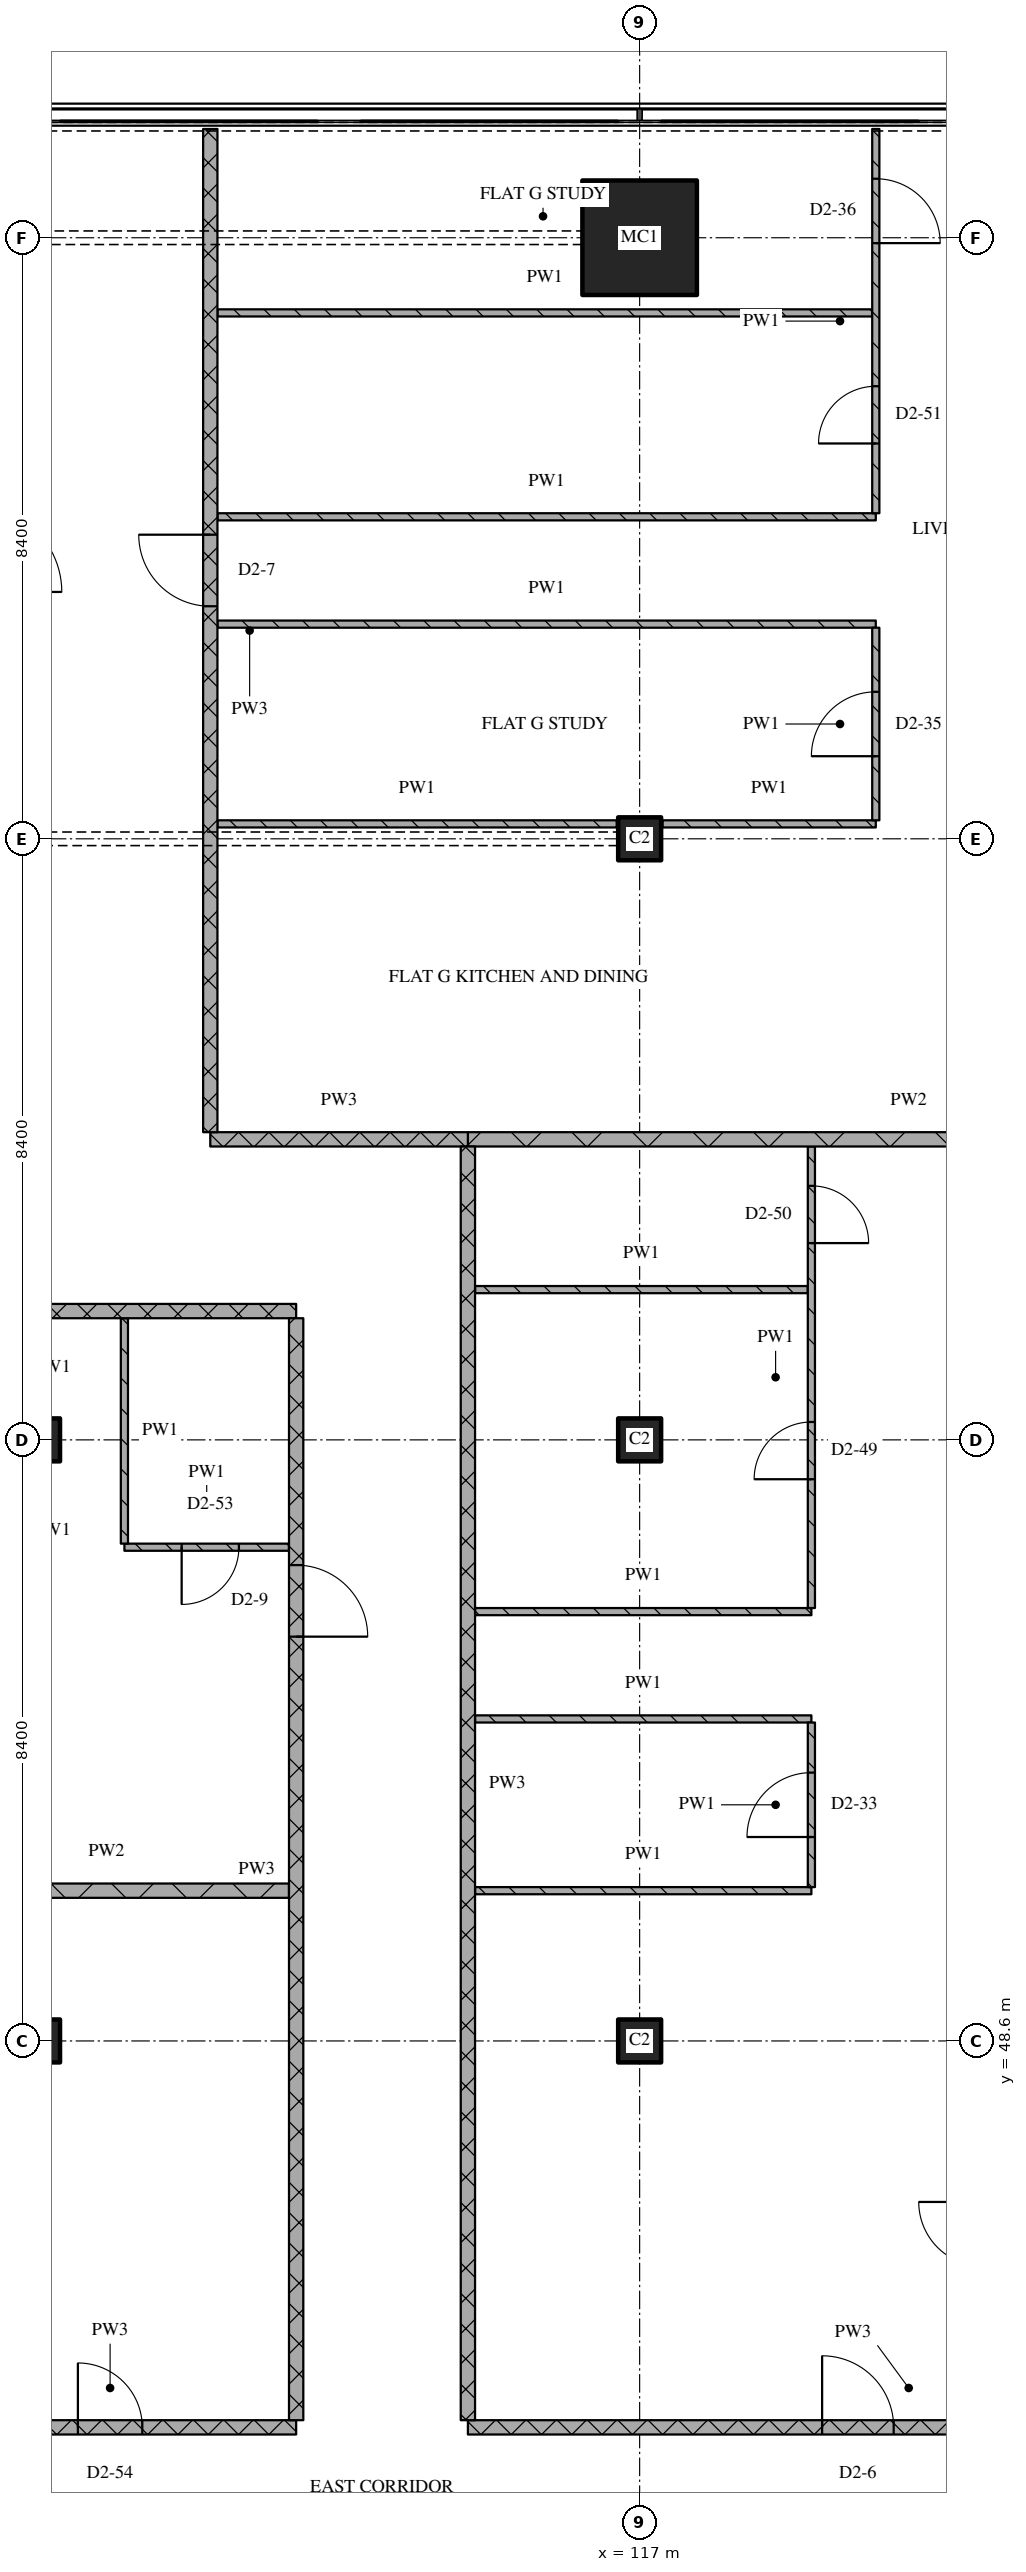
"""IFC4 building model, lengths in metres.
Left out: names, types, materials, properties, quantities, classifications, styles, units other than length and angle.
Written with IfcOpenShell. Run it as: python <this file> out.ifc"""

import sys

from ifc_helpers import new_model, si_unit, direction, frame, frame_2d, origin, origin_2d, place, context, subcontext, project, spatial, rectangle, extrude, element, fill, save


model = new_model("IFC4")
c1 = context("Model", 3, precision=1e-05, world=origin(), true_north=direction((0.0, 1.0)))
c2 = subcontext(c1, "Body", "Model", "MODEL_VIEW")
j1 = project(units=[si_unit("LENGTHUNIT", "METRE"), si_unit("PLANEANGLEUNIT", "RADIAN")], contexts=[c1])
p1 = place(None, origin())
s1 = spatial("IfcSite", under=j1, at=p1, CompositionType="ELEMENT")
p2 = place(p1, origin())
s2 = spatial("IfcBuilding", under=s1, at=p2, CompositionType="ELEMENT")
p3 = place(p2, frame((0.0, 0.0, 216.3)))
s3 = spatial("IfcBuildingStorey", under=s2, at=p3, CompositionType="ELEMENT", Elevation=216.3)
for number, where, z_axis, x_axis in (
    (1, (108.6, 48.6, 0.0), (0.0, 0.0, 1.0), (1.0, 0.0, 0.0)),
    (2, (108.6, 57.0, 0.0), (0.0, 0.0, 1.0), (1.0, 0.0, 0.0)),
    (3, (117.0, 48.6, 0.0), (0.0, 0.0, 1.0), (1.0, 0.0, 0.0)),
    (4, (117.0, 57.0, 0.0), (0.0, 0.0, 1.0), (1.0, 0.0, 0.0)),
    (5, (117.0, 65.4, 0.0), (0.0, 0.0, 1.0), (1.0, 0.0, 0.0)),
):
    element("IfcColumn", number, at=place(p3, frame(where, z_axis=z_axis, x_axis=x_axis)), inside=s3, PredefinedType="COLUMN", context=c2, shape_type="SweptSolid", body=[
        extrude(rectangle(XDim=0.6, YDim=0.6, at=origin_2d()), origin(), (0.0, 0.0, 1.0), 3.6),
    ])
p4 = place(p3, frame((117.0, 73.8, 0.0), z_axis=(0.0, 0.0, 1.0), x_axis=(1.0, 0.0, 0.0)))
e6 = element("IfcColumn", 6, at=p4, inside=s3, PredefinedType="COLUMN", context=c2, shape_type="SweptSolid", body=[
    extrude(rectangle(XDim=1.6, YDim=1.6, at=origin_2d()), origin(), (0.0, 0.0, 1.0), 3.6),
])
p5 = place(p3, frame((107.0, 43.2, 0.0), z_axis=(0.0, 0.0, 1.0), x_axis=(1.0, 0.0, 0.0)))
e7 = element("IfcWall", 7, at=p5, inside=s3, PredefinedType="PARTITIONING", context=c2, shape_type="SweptSolid", body=[
    extrude(rectangle(XDim=5.2, YDim=0.2, at=frame_2d((2.6, 0.0))), origin(), (0.0, 0.0, 1.0), 3.32),
])
p6 = place(p5, frame((2.15, 0.0, 0.0)))
e8 = element("IfcOpeningElement", 8, at=p6, cuts=e7, PredefinedType="OPENING", context=c2, shape_type="SweptSolid", body=[
    extrude(rectangle(XDim=0.9, YDim=2.1, at=frame_2d((0.45, 1.05))), frame((0.0, 0.11, 0.0), z_axis=(0.0, -1.0, 0.0), x_axis=(1.0, 0.0, 0.0)), (0.0, 0.0, 1.0), 0.22),
])
p7 = place(p3, frame((114.6, 43.2, 0.0), z_axis=(0.0, 0.0, 1.0), x_axis=(1.0, 0.0, 0.0)))
e9 = element("IfcWall", 9, at=p7, inside=s3, PredefinedType="PARTITIONING", context=c2, shape_type="SweptSolid", body=[
    extrude(rectangle(XDim=12.32, YDim=0.2, at=frame_2d((6.16, 0.0))), origin(), (0.0, 0.0, 1.0), 3.32),
])
p8 = place(p7, frame((4.95, 0.0, 0.0)))
e10 = element("IfcOpeningElement", 10, at=p8, cuts=e9, PredefinedType="OPENING", context=c2, shape_type="SweptSolid", body=[
    extrude(rectangle(XDim=1.0, YDim=2.1, at=frame_2d((0.5, 1.05))), frame((0.0, 0.11, 0.0), z_axis=(0.0, -1.0, 0.0), x_axis=(1.0, 0.0, 0.0)), (0.0, 0.0, 1.0), 0.22),
])
p9 = place(p3, frame((107.0, 50.7, 0.0), z_axis=(0.0, 0.0, 1.0), x_axis=(1.0, 0.0, 0.0)))
e11 = element("IfcWall", 11, at=p9, inside=s3, PredefinedType="PARTITIONING", context=c2, shape_type="SweptSolid", body=[
    extrude(rectangle(XDim=5.1, YDim=0.2, at=frame_2d((2.55, 0.0))), origin(), (0.0, 0.0, 1.0), 3.32),
])
for number, where, z_axis, x_axis in (
    (12, (114.7, 50.7, 0.0), (0.0, 0.0, 1.0), (1.0, 0.0, 0.0)),
    (13, (114.7, 53.1, 0.0), (0.0, 0.0, 1.0), (1.0, 0.0, 0.0)),
    (14, (114.7, 54.6, 0.0), (0.0, 0.0, 1.0), (1.0, 0.0, 0.0)),
):
    element("IfcWall", number, at=place(p3, frame(where, z_axis=z_axis, x_axis=x_axis)), inside=s3, PredefinedType="PARTITIONING", context=c2, shape_type="SweptSolid", body=[
        extrude(rectangle(XDim=4.7, YDim=0.1, at=frame_2d((2.35, 0.0))), origin(), (0.0, 0.0, 1.0), 3.32),
    ])
p10 = place(p3, frame((109.8, 55.5, 0.0), z_axis=(0.0, 0.0, 1.0), x_axis=(1.0, 0.0, 0.0)))
e15 = element("IfcWall", 15, at=p10, inside=s3, PredefinedType="PARTITIONING", context=c2, shape_type="SweptSolid", body=[
    extrude(rectangle(XDim=2.3, YDim=0.1, at=frame_2d((1.15, 0.0))), origin(), (0.0, 0.0, 1.0), 3.32),
])
p11 = place(p10, frame((0.8, 0.0, 0.0)))
e16 = element("IfcOpeningElement", 16, at=p11, cuts=e15, PredefinedType="OPENING", context=c2, shape_type="SweptSolid", body=[
    extrude(rectangle(XDim=0.8, YDim=2.1, at=frame_2d((0.4, 1.05))), frame((0.0, 0.06, 0.0), z_axis=(0.0, -1.0, 0.0), x_axis=(1.0, 0.0, 0.0)), (0.0, 0.0, 1.0), 0.12),
])
p12 = place(p3, frame((101.4, 58.8, 0.0), z_axis=(0.0, 0.0, 1.0), x_axis=(1.0, 0.0, 0.0)))
e17 = element("IfcWall", 17, at=p12, inside=s3, PredefinedType="PARTITIONING", context=c2, shape_type="SweptSolid", body=[
    extrude(rectangle(XDim=10.8, YDim=0.2, at=frame_2d((5.4, 0.0))), origin(), (0.0, 0.0, 1.0), 3.32),
])
p13 = place(p3, frame((114.7, 59.1, 0.0), z_axis=(0.0, 0.0, 1.0), x_axis=(1.0, 0.0, 0.0)))
e18 = element("IfcWall", 18, at=p13, inside=s3, PredefinedType="PARTITIONING", context=c2, shape_type="SweptSolid", body=[
    extrude(rectangle(XDim=4.65, YDim=0.1, at=frame_2d((2.325, 0.0))), origin(), (0.0, 0.0, 1.0), 3.32),
])
p14 = place(p3, frame((111.0, 61.2, 0.0), z_axis=(0.0, 0.0, 1.0), x_axis=(1.0, 0.0, 0.0)))
e19 = element("IfcWall", 19, at=p14, inside=s3, PredefinedType="PARTITIONING", context=c2, shape_type="SweptSolid", body=[
    extrude(rectangle(XDim=3.6, YDim=0.2, at=frame_2d((1.8, 0.0))), origin(), (0.0, 0.0, 1.0), 3.32),
])
p15 = place(p3, frame((114.6, 61.2, 0.0), z_axis=(0.0, 0.0, 1.0), x_axis=(1.0, 0.0, 0.0)))
e20 = element("IfcWall", 20, at=p15, inside=s3, PredefinedType="PARTITIONING", context=c2, shape_type="SweptSolid", body=[
    extrude(rectangle(XDim=12.32, YDim=0.2, at=frame_2d((6.16, 0.0))), origin(), (0.0, 0.0, 1.0), 3.32),
])
p16 = place(p3, frame((111.1, 65.609, 0.0), z_axis=(0.0, 0.0, 1.0), x_axis=(1.0, 0.0, 0.0)))
e21 = element("IfcWall", 21, at=p16, inside=s3, PredefinedType="PARTITIONING", context=c2, shape_type="SweptSolid", body=[
    extrude(rectangle(XDim=5.58, YDim=0.1, at=frame_2d((2.79, 0.0))), origin(), (0.0, 0.0, 1.0), 3.32),
])
p17 = place(p3, frame((117.32, 65.609, 0.0), z_axis=(0.0, 0.0, 1.0), x_axis=(1.0, 0.0, 0.0)))
e22 = element("IfcWall", 22, at=p17, inside=s3, PredefinedType="PARTITIONING", context=c2, shape_type="SweptSolid", body=[
    extrude(rectangle(XDim=2.98, YDim=0.1, at=frame_2d((1.49, 0.0))), origin(), (0.0, 0.0, 1.0), 3.32),
])
for number, where, z_axis, x_axis in (
    (23, (111.1, 68.4, 0.0), (0.0, 0.0, 1.0), (1.0, 0.0, 0.0)),
    (24, (111.1, 69.9, 0.0), (0.0, 0.0, 1.0), (1.0, 0.0, 0.0)),
):
    element("IfcWall", number, at=place(p3, frame(where, z_axis=z_axis, x_axis=x_axis)), inside=s3, PredefinedType="PARTITIONING", context=c2, shape_type="SweptSolid", body=[
        extrude(rectangle(XDim=9.2, YDim=0.1, at=frame_2d((4.6, 0.0))), origin(), (0.0, 0.0, 1.0), 3.32),
    ])
p18 = place(p3, frame((111.1, 72.75, 0.0), z_axis=(0.0, 0.0, 1.0), x_axis=(1.0, 0.0, 0.0)))
e25 = element("IfcWall", 25, at=p18, inside=s3, PredefinedType="PARTITIONING", context=c2, shape_type="SweptSolid", body=[
    extrude(rectangle(XDim=9.15, YDim=0.1, at=frame_2d((4.575, 0.0))), origin(), (0.0, 0.0, 1.0), 3.32),
])
p19 = place(p3, frame((109.8, 58.7, 0.0), z_axis=(0.0, 0.0, 1.0), x_axis=(0.0, -1.0, 0.0)))
e26 = element("IfcWall", 26, at=p19, inside=s3, PredefinedType="PARTITIONING", context=c2, shape_type="SweptSolid", body=[
    extrude(rectangle(XDim=3.15, YDim=0.1, at=frame_2d((1.575, 0.0))), origin(), (0.0, 0.0, 1.0), 3.32),
])
p20 = place(p3, frame((111.0, 75.32, 0.0), z_axis=(0.0, 0.0, 1.0), x_axis=(0.0, -1.0, 0.0)))
e27 = element("IfcWall", 27, at=p20, inside=s3, PredefinedType="PARTITIONING", context=c2, shape_type="SweptSolid", body=[
    extrude(rectangle(XDim=14.02, YDim=0.2, at=frame_2d((7.01, 0.0))), origin(), (0.0, 0.0, 1.0), 3.32),
])
p21 = place(p20, frame((5.67, 0.0, 0.0)))
e28 = element("IfcOpeningElement", 28, at=p21, cuts=e27, PredefinedType="OPENING", context=c2, shape_type="SweptSolid", body=[
    extrude(rectangle(XDim=1.0, YDim=2.1, at=frame_2d((0.5, 1.05))), frame((0.0, 0.11, 0.0), z_axis=(0.0, -1.0, 0.0), x_axis=(1.0, 0.0, 0.0)), (0.0, 0.0, 1.0), 0.22),
])
p22 = place(p3, frame((112.2, 43.3, 0.0), z_axis=(0.0, 0.0, 1.0), x_axis=(0.0, 1.0, 0.0)))
e29 = element("IfcWall", 29, at=p22, inside=s3, PredefinedType="PARTITIONING", context=c2, shape_type="SweptSolid", body=[
    extrude(rectangle(XDim=15.4, YDim=0.2, at=frame_2d((7.7, 0.0))), origin(), (0.0, 0.0, 1.0), 3.32),
])
p23 = place(p22, frame((10.95, 0.0, 0.0)))
e30 = element("IfcOpeningElement", 30, at=p23, cuts=e29, PredefinedType="OPENING", context=c2, shape_type="SweptSolid", body=[
    extrude(rectangle(XDim=1.0, YDim=2.1, at=frame_2d((0.5, 1.05))), frame((0.0, 0.11, 0.0), z_axis=(0.0, -1.0, 0.0), x_axis=(1.0, 0.0, 0.0)), (0.0, 0.0, 1.0), 0.22),
])
p24 = place(p3, frame((114.6, 61.1, 0.0), z_axis=(0.0, 0.0, 1.0), x_axis=(0.0, -1.0, 0.0)))
e31 = element("IfcWall", 31, at=p24, inside=s3, PredefinedType="PARTITIONING", context=c2, shape_type="SweptSolid", body=[
    extrude(rectangle(XDim=17.8, YDim=0.2, at=frame_2d((8.9, 0.0))), origin(), (0.0, 0.0, 1.0), 3.32),
])
p25 = place(p3, frame((119.4, 50.75, 0.0), z_axis=(0.0, 0.0, 1.0), x_axis=(0.0, 1.0, 0.0)))
e32 = element("IfcWall", 32, at=p25, inside=s3, PredefinedType="PARTITIONING", context=c2, shape_type="SweptSolid", body=[
    extrude(rectangle(XDim=2.3, YDim=0.1, at=frame_2d((1.15, 0.0))), origin(), (0.0, 0.0, 1.0), 3.32),
])
p26 = place(p25, frame((0.7, 0.0, 0.0)))
e33 = element("IfcOpeningElement", 33, at=p26, cuts=e32, PredefinedType="OPENING", context=c2, shape_type="SweptSolid", body=[
    extrude(rectangle(XDim=0.9, YDim=2.1, at=frame_2d((0.45, 1.05))), frame((0.0, 0.06, 0.0), z_axis=(0.0, -1.0, 0.0), x_axis=(1.0, 0.0, 0.0)), (0.0, 0.0, 1.0), 0.12),
])
p27 = place(p3, frame((119.4, 54.65, 0.0), z_axis=(0.0, 0.0, 1.0), x_axis=(0.0, 1.0, 0.0)))
e34 = element("IfcWall", 34, at=p27, inside=s3, PredefinedType="PARTITIONING", context=c2, shape_type="SweptSolid", body=[
    extrude(rectangle(XDim=6.45, YDim=0.1, at=frame_2d((3.225, 0.0))), origin(), (0.0, 0.0, 1.0), 3.32),
])
p28 = place(p27, frame((1.8, 0.0, 0.0)))
e35 = element("IfcOpeningElement", 35, at=p28, cuts=e34, PredefinedType="OPENING", context=c2, shape_type="SweptSolid", body=[
    extrude(rectangle(XDim=0.8, YDim=2.1, at=frame_2d((0.4, 1.05))), frame((0.0, 0.06, 0.0), z_axis=(0.0, -1.0, 0.0), x_axis=(1.0, 0.0, 0.0)), (0.0, 0.0, 1.0), 0.12),
])
p29 = place(p27, frame((5.1, 0.0, 0.0)))
e36 = element("IfcOpeningElement", 36, at=p29, cuts=e34, PredefinedType="OPENING", context=c2, shape_type="SweptSolid", body=[
    extrude(rectangle(XDim=0.8, YDim=2.1, at=frame_2d((0.4, 1.05))), frame((0.0, 0.06, 0.0), z_axis=(0.0, -1.0, 0.0), x_axis=(1.0, 0.0, 0.0)), (0.0, 0.0, 1.0), 0.12),
])
p30 = place(p3, frame((120.3, 65.659, 0.0), z_axis=(0.0, 0.0, 1.0), x_axis=(0.0, 1.0, 0.0)))
e37 = element("IfcWall", 37, at=p30, inside=s3, PredefinedType="PARTITIONING", context=c2, shape_type="SweptSolid", body=[
    extrude(rectangle(XDim=2.691, YDim=0.1, at=frame_2d((1.346, 0.0))), origin(), (0.0, 0.0, 1.0), 3.32),
])
p31 = place(p30, frame((0.896, 0.0, 0.0)))
e38 = element("IfcOpeningElement", 38, at=p31, cuts=e37, PredefinedType="OPENING", context=c2, shape_type="SweptSolid", body=[
    extrude(rectangle(XDim=0.9, YDim=2.1, at=frame_2d((0.45, 1.05))), frame((0.0, 0.06, 0.0), z_axis=(0.0, -1.0, 0.0), x_axis=(1.0, 0.0, 0.0)), (0.0, 0.0, 1.0), 0.12),
])
p32 = place(p3, frame((120.3, 69.95, 0.0), z_axis=(0.0, 0.0, 1.0), x_axis=(0.0, 1.0, 0.0)))
e39 = element("IfcWall", 39, at=p32, inside=s3, PredefinedType="PARTITIONING", context=c2, shape_type="SweptSolid", body=[
    extrude(rectangle(XDim=5.37, YDim=0.1, at=frame_2d((2.685, 0.0))), origin(), (0.0, 0.0, 1.0), 3.32),
])
p33 = place(p32, frame((0.975, 0.0, 0.0)))
e40 = element("IfcOpeningElement", 40, at=p33, cuts=e39, PredefinedType="OPENING", context=c2, shape_type="SweptSolid", body=[
    extrude(rectangle(XDim=0.8, YDim=2.1, at=frame_2d((0.4, 1.05))), frame((0.0, 0.06, 0.0), z_axis=(0.0, -1.0, 0.0), x_axis=(1.0, 0.0, 0.0)), (0.0, 0.0, 1.0), 0.12),
])
p34 = place(p32, frame((3.775, 0.0, 0.0)))
e41 = element("IfcOpeningElement", 41, at=p34, cuts=e39, PredefinedType="OPENING", context=c2, shape_type="SweptSolid", body=[
    extrude(rectangle(XDim=0.9, YDim=2.1, at=frame_2d((0.45, 1.05))), frame((0.0, 0.06, 0.0), z_axis=(0.0, -1.0, 0.0), x_axis=(1.0, 0.0, 0.0)), (0.0, 0.0, 1.0), 0.12),
])
p35 = place(p6, origin())
e42 = element("IfcDoor", 42, at=p35, inside=s3, OperationType="SINGLE_SWING_LEFT", PredefinedType="DOOR", context=c2, shape_type="SweptSolid", body=[
    extrude(rectangle(XDim=0.9, YDim=2.1, at=frame_2d((0.45, 1.05))), frame((0.0, 0.025, 0.0), z_axis=(0.0, -1.0, 0.0), x_axis=(1.0, 0.0, 0.0)), (0.0, 0.0, 1.0), 0.05),
])
fill(e8, e42)
p36 = place(p8, origin())
e43 = element("IfcDoor", 43, at=p36, inside=s3, OperationType="SINGLE_SWING_LEFT", PredefinedType="DOOR", context=c2, shape_type="SweptSolid", body=[
    extrude(rectangle(XDim=1.0, YDim=2.1, at=frame_2d((0.5, 1.05))), frame((0.0, 0.025, 0.0), z_axis=(0.0, -1.0, 0.0), x_axis=(1.0, 0.0, 0.0)), (0.0, 0.0, 1.0), 0.05),
])
fill(e10, e43)
p37 = place(p11, origin())
e44 = element("IfcDoor", 44, at=p37, inside=s3, OperationType="SINGLE_SWING_RIGHT", PredefinedType="DOOR", context=c2, shape_type="SweptSolid", body=[
    extrude(rectangle(XDim=0.8, YDim=2.1, at=frame_2d((0.4, 1.05))), frame((0.0, 0.025, 0.0), z_axis=(0.0, -1.0, 0.0), x_axis=(1.0, 0.0, 0.0)), (0.0, 0.0, 1.0), 0.05),
])
fill(e16, e44)
p38 = place(p21, origin())
e45 = element("IfcDoor", 45, at=p38, inside=s3, OperationType="SINGLE_SWING_RIGHT", PredefinedType="DOOR", context=c2, shape_type="SweptSolid", body=[
    extrude(rectangle(XDim=1.0, YDim=2.1, at=frame_2d((0.5, 1.05))), frame((0.0, 0.025, 0.0), z_axis=(0.0, -1.0, 0.0), x_axis=(1.0, 0.0, 0.0)), (0.0, 0.0, 1.0), 0.05),
])
fill(e28, e45)
p39 = place(p23, origin())
e46 = element("IfcDoor", 46, at=p39, inside=s3, OperationType="SINGLE_SWING_RIGHT", PredefinedType="DOOR", context=c2, shape_type="SweptSolid", body=[
    extrude(rectangle(XDim=1.0, YDim=2.1, at=frame_2d((0.5, 1.05))), frame((0.0, 0.025, 0.0), z_axis=(0.0, -1.0, 0.0), x_axis=(1.0, 0.0, 0.0)), (0.0, 0.0, 1.0), 0.05),
])
fill(e30, e46)
p40 = place(p26, origin())
e47 = element("IfcDoor", 47, at=p40, inside=s3, OperationType="SINGLE_SWING_LEFT", PredefinedType="DOOR", context=c2, shape_type="SweptSolid", body=[
    extrude(rectangle(XDim=0.9, YDim=2.1, at=frame_2d((0.45, 1.05))), frame((0.0, 0.025, 0.0), z_axis=(0.0, -1.0, 0.0), x_axis=(1.0, 0.0, 0.0)), (0.0, 0.0, 1.0), 0.05),
])
fill(e33, e47)
p41 = place(p28, origin())
e48 = element("IfcDoor", 48, at=p41, inside=s3, OperationType="SINGLE_SWING_LEFT", PredefinedType="DOOR", context=c2, shape_type="SweptSolid", body=[
    extrude(rectangle(XDim=0.8, YDim=2.1, at=frame_2d((0.4, 1.05))), frame((0.0, 0.025, 0.0), z_axis=(0.0, -1.0, 0.0), x_axis=(1.0, 0.0, 0.0)), (0.0, 0.0, 1.0), 0.05),
])
fill(e35, e48)
p42 = place(p29, origin())
e49 = element("IfcDoor", 49, at=p42, inside=s3, OperationType="SINGLE_SWING_RIGHT", PredefinedType="DOOR", context=c2, shape_type="SweptSolid", body=[
    extrude(rectangle(XDim=0.8, YDim=2.1, at=frame_2d((0.4, 1.05))), frame((0.0, 0.025, 0.0), z_axis=(0.0, -1.0, 0.0), x_axis=(1.0, 0.0, 0.0)), (0.0, 0.0, 1.0), 0.05),
])
fill(e36, e49)
p43 = place(p31, origin())
e50 = element("IfcDoor", 50, at=p43, inside=s3, OperationType="SINGLE_SWING_LEFT", PredefinedType="DOOR", context=c2, shape_type="SweptSolid", body=[
    extrude(rectangle(XDim=0.9, YDim=2.1, at=frame_2d((0.45, 1.05))), frame((0.0, 0.025, 0.0), z_axis=(0.0, -1.0, 0.0), x_axis=(1.0, 0.0, 0.0)), (0.0, 0.0, 1.0), 0.05),
])
fill(e38, e50)
p44 = place(p33, origin())
e51 = element("IfcDoor", 51, at=p44, inside=s3, OperationType="SINGLE_SWING_LEFT", PredefinedType="DOOR", context=c2, shape_type="SweptSolid", body=[
    extrude(rectangle(XDim=0.8, YDim=2.1, at=frame_2d((0.4, 1.05))), frame((0.0, 0.025, 0.0), z_axis=(0.0, -1.0, 0.0), x_axis=(1.0, 0.0, 0.0)), (0.0, 0.0, 1.0), 0.05),
])
fill(e40, e51)
p45 = place(p34, origin())
e52 = element("IfcDoor", 52, at=p45, inside=s3, OperationType="SINGLE_SWING_RIGHT", PredefinedType="DOOR", context=c2, shape_type="SweptSolid", body=[
    extrude(rectangle(XDim=0.9, YDim=2.1, at=frame_2d((0.45, 1.05))), frame((0.0, 0.025, 0.0), z_axis=(0.0, -1.0, 0.0), x_axis=(1.0, 0.0, 0.0)), (0.0, 0.0, 1.0), 0.05),
])
fill(e41, e52)
save(model, sys.argv[1])
